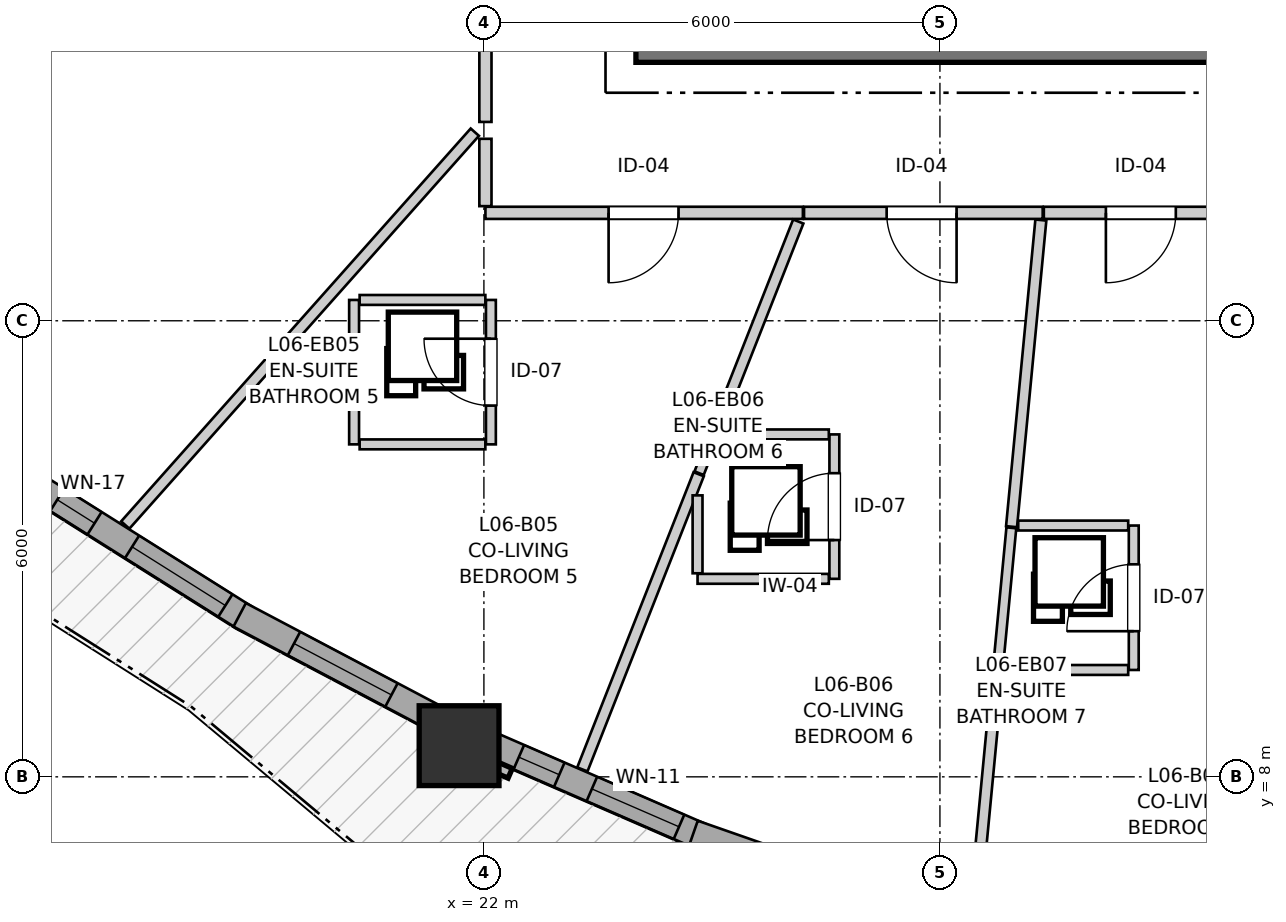
"""IFC4 building model, lengths in metres.
Left out: names, types, materials, properties, quantities, classifications, styles, units other than length and angle.
Written with IfcOpenShell. Run it as: python <this file> out.ifc"""

import sys

from ifc_helpers import new_model, si_unit, direction, frame, frame_2d, origin, origin_2d, place, context, subcontext, project, spatial, rectangle, extrude, source, transform, mapped, element, fill, save


model = new_model("IFC4")
c1 = context("Model", 3, precision=1e-05, world=origin(), true_north=direction((0.0, 1.0)))
c2 = subcontext(c1, "Body", "Model", "MODEL_VIEW")
j1 = project(units=[si_unit("LENGTHUNIT", "METRE"), si_unit("PLANEANGLEUNIT", "RADIAN")], contexts=[c1])
p1 = place(None, origin())
s1 = spatial("IfcSite", under=j1, at=p1, CompositionType="ELEMENT")
p2 = place(p1, origin())
s2 = spatial("IfcBuilding", under=s1, at=p2, CompositionType="ELEMENT")
p3 = place(p2, frame((0.0, 0.0, 23.8)))
s3 = spatial("IfcBuildingStorey", under=s2, at=p3, CompositionType="ELEMENT", Elevation=23.8)
p4 = place(p3, frame((24.0, 17.8, 0.0), z_axis=(0.0, 0.0, 1.0), x_axis=(1.0, 0.0, 0.0)))
e1 = element("IfcWall", 1, at=p4, inside=s3, PredefinedType="SHEAR", context=c2, shape_type="SweptSolid", body=[
    extrude(rectangle(XDim=12.7, YDim=0.8, at=frame_2d((6.35, 0.0))), origin(), (0.0, 0.0, 1.0), 2.935),
])
m1 = source(origin(), c2, "Body", "SweptSolid", [
    extrude(rectangle(XDim=1.05, YDim=1.05, at=origin_2d()), origin(), (0.0, 0.0, 1.0), 2.935),
])
p5 = place(p3, frame((21.673, 8.41, 0.0), z_axis=(0.0, 0.0, 1.0), x_axis=(1.0, 0.0, 0.0)))
e2 = element("IfcColumn", 2, at=p5, inside=s3, PredefinedType="COLUMN", context=c2, shape_type="MappedRepresentation", body=[
    mapped(m1, transform((0.0, 0.0, 0.0), x_axis=(1.0, 0.0, 0.0), y_axis=(0.0, 1.0, 0.0), z_axis=(0.0, 0.0, 1.0), scale=1.0)),
])
p6 = place(p3, frame((16.04, 11.864, 0.0), z_axis=(0.0, 0.0, 1.0), x_axis=(0.846428302834, -0.532502702492, 0.0)))
e3 = element("IfcWall", 3, at=p6, inside=s3, PredefinedType="SOLIDWALL", context=c2, shape_type="SweptSolid", body=[
    extrude(rectangle(XDim=3.336, YDim=0.35, at=frame_2d((1.668, 0.0))), origin(), (0.0, 0.0, 1.0), 2.415),
])
p7 = place(p6, frame((0.409, 0.0, 0.82)))
e4 = element("IfcOpeningElement", 4, at=p7, cuts=e3, PredefinedType="OPENING", context=c2, shape_type="SweptSolid", body=[
    extrude(rectangle(XDim=0.58, YDim=1.35, at=frame_2d((0.29, 0.675))), frame((0.0, 0.185, 0.0), z_axis=(0.0, -1.0, 0.0), x_axis=(1.0, 0.0, 0.0)), (0.0, 0.0, 1.0), 0.37),
])
p8 = place(p6, frame((1.573, 0.0, 0.82)))
e5 = element("IfcOpeningElement", 5, at=p8, cuts=e3, PredefinedType="OPENING", context=c2, shape_type="SweptSolid", body=[
    extrude(rectangle(XDim=1.45, YDim=1.25, at=frame_2d((0.725, 0.625))), frame((0.0, 0.185, 0.0), z_axis=(0.0, -1.0, 0.0), x_axis=(1.0, 0.0, 0.0)), (0.0, 0.0, 1.0), 0.37),
])
p9 = place(p3, frame((18.787, 10.131, 0.0), z_axis=(0.0, 0.0, 1.0), x_axis=(0.88440307047, -0.466723910834, 0.0)))
e6 = element("IfcWall", 6, at=p9, inside=s3, PredefinedType="SOLIDWALL", context=c2, shape_type="SweptSolid", body=[
    extrude(rectangle(XDim=3.056, YDim=0.35, at=frame_2d((1.528, 0.0))), origin(), (0.0, 0.0, 1.0), 2.415),
])
p10 = place(p9, frame((0.808, 0.0, 0.82)))
e7 = element("IfcOpeningElement", 7, at=p10, cuts=e6, PredefinedType="OPENING", context=c2, shape_type="SweptSolid", body=[
    extrude(rectangle(XDim=1.45, YDim=1.25, at=frame_2d((0.725, 0.625))), frame((0.0, 0.185, 0.0), z_axis=(0.0, -1.0, 0.0), x_axis=(1.0, 0.0, 0.0)), (0.0, 0.0, 1.0), 0.37),
])
p11 = place(p3, frame((22.018, 8.451, 0.0), z_axis=(0.0, 0.0, 1.0), x_axis=(0.917071318244, -0.398723208824, 0.0)))
e8 = element("IfcWall", 8, at=p11, inside=s3, PredefinedType="SOLIDWALL", context=c2, shape_type="SweptSolid", body=[
    extrude(rectangle(XDim=3.076, YDim=0.35, at=frame_2d((1.538, 0.0))), origin(), (0.0, 0.0, 1.0), 2.415),
])
p12 = place(p11, frame((0.481, 0.0, 0.82)))
e9 = element("IfcOpeningElement", 9, at=p12, cuts=e8, PredefinedType="OPENING", context=c2, shape_type="SweptSolid", body=[
    extrude(rectangle(XDim=0.58, YDim=1.35, at=frame_2d((0.29, 0.675))), frame((0.0, 0.185, 0.0), z_axis=(0.0, -1.0, 0.0), x_axis=(1.0, 0.0, 0.0)), (0.0, 0.0, 1.0), 0.37),
])
p13 = place(p11, frame((1.529, 0.0, 0.82)))
e10 = element("IfcOpeningElement", 10, at=p13, cuts=e8, PredefinedType="OPENING", context=c2, shape_type="SweptSolid", body=[
    extrude(rectangle(XDim=1.25, YDim=1.35, at=frame_2d((0.625, 0.675))), frame((0.0, 0.185, 0.0), z_axis=(0.0, -1.0, 0.0), x_axis=(1.0, 0.0, 0.0)), (0.0, 0.0, 1.0), 0.37),
])
p14 = place(p3, frame((24.756, 7.257, 0.0), z_axis=(0.0, 0.0, 1.0), x_axis=(0.944142925437, -0.329536244361, 0.0)))
e11 = element("IfcWall", 11, at=p14, inside=s3, PredefinedType="SOLIDWALL", context=c2, shape_type="SweptSolid", body=[
    extrude(rectangle(XDim=3.393, YDim=0.35, at=frame_2d((1.697, 0.0))), origin(), (0.0, 0.0, 1.0), 2.415),
])
p15 = place(p14, frame((0.982, 0.0, 0.82)))
e12 = element("IfcOpeningElement", 12, at=p15, cuts=e11, PredefinedType="OPENING", context=c2, shape_type="SweptSolid", body=[
    extrude(rectangle(XDim=1.45, YDim=1.25, at=frame_2d((0.725, 0.625))), frame((0.0, 0.185, 0.0), z_axis=(0.0, -1.0, 0.0), x_axis=(1.0, 0.0, 0.0)), (0.0, 0.0, 1.0), 0.37),
])
p16 = place(p3, frame((22.02, 16.616, 0.0), z_axis=(0.0, 0.0, 1.0), x_axis=(0.0, 1.0, 0.0)))
e13 = element("IfcWall", 13, at=p16, inside=s3, PredefinedType="PARTITIONING", context=c2, shape_type="SweptSolid", body=[
    extrude(rectangle(XDim=7.534, YDim=0.16, at=frame_2d((3.767, 0.0))), origin(), (0.0, 0.0, 1.0), 2.935),
])
p17 = place(p16, frame((2.98, 0.0, 0.0)))
e14 = element("IfcOpeningElement", 14, at=p17, cuts=e13, PredefinedType="OPENING", context=c2, shape_type="SweptSolid", body=[
    extrude(rectangle(XDim=1.3, YDim=2.1, at=frame_2d((0.65, 1.05))), frame((0.0, 0.09, 0.0), z_axis=(0.0, -1.0, 0.0), x_axis=(1.0, 0.0, 0.0)), (0.0, 0.0, 1.0), 0.18),
])
p18 = place(p3, frame((26.197, 15.42, 0.0), z_axis=(0.0, 0.0, 1.0), x_axis=(-1.0, 0.0, 0.0)))
e15 = element("IfcWall", 15, at=p18, inside=s3, PredefinedType="PARTITIONING", context=c2, shape_type="SweptSolid", body=[
    extrude(rectangle(XDim=4.177, YDim=0.16, at=frame_2d((2.088, 0.0))), origin(), (0.0, 0.0, 1.0), 2.935),
])
p19 = place(p18, frame((1.636, 0.0, 0.0)))
e16 = element("IfcOpeningElement", 16, at=p19, cuts=e15, PredefinedType="OPENING", context=c2, shape_type="SweptSolid", body=[
    extrude(rectangle(XDim=0.92, YDim=2.1, at=frame_2d((0.46, 1.05))), frame((0.0, 0.09, 0.0), z_axis=(0.0, -1.0, 0.0), x_axis=(1.0, 0.0, 0.0)), (0.0, 0.0, 1.0), 0.18),
])
p20 = place(p3, frame((29.352, 15.42, 0.0), z_axis=(0.0, 0.0, 1.0), x_axis=(-1.0, 0.0, 0.0)))
e17 = element("IfcWall", 17, at=p20, inside=s3, PredefinedType="PARTITIONING", context=c2, shape_type="SweptSolid", body=[
    extrude(rectangle(XDim=3.14, YDim=0.16, at=frame_2d((1.57, 0.0))), origin(), (0.0, 0.0, 1.0), 2.935),
])
p21 = place(p20, frame((1.133, 0.0, 0.0)))
e18 = element("IfcOpeningElement", 18, at=p21, cuts=e17, PredefinedType="OPENING", context=c2, shape_type="SweptSolid", body=[
    extrude(rectangle(XDim=0.92, YDim=2.1, at=frame_2d((0.46, 1.05))), frame((0.0, 0.09, 0.0), z_axis=(0.0, -1.0, 0.0), x_axis=(1.0, 0.0, 0.0)), (0.0, 0.0, 1.0), 0.18),
])
p22 = place(p3, frame((31.965, 15.42, 0.0), z_axis=(0.0, 0.0, 1.0), x_axis=(-1.0, 0.0, 0.0)))
e19 = element("IfcWall", 19, at=p22, inside=s3, PredefinedType="PARTITIONING", context=c2, shape_type="SweptSolid", body=[
    extrude(rectangle(XDim=2.598, YDim=0.16, at=frame_2d((1.299, 0.0))), origin(), (0.0, 0.0, 1.0), 2.935),
])
p23 = place(p22, frame((0.862, 0.0, 0.0)))
e20 = element("IfcOpeningElement", 20, at=p23, cuts=e19, PredefinedType="OPENING", context=c2, shape_type="SweptSolid", body=[
    extrude(rectangle(XDim=0.92, YDim=2.1, at=frame_2d((0.46, 1.05))), frame((0.0, 0.09, 0.0), z_axis=(0.0, -1.0, 0.0), x_axis=(1.0, 0.0, 0.0)), (0.0, 0.0, 1.0), 0.18),
])
p24 = place(p3, frame((26.611, 10.605, 0.0), z_axis=(0.0, 0.0, 1.0), x_axis=(0.0, 1.0, 0.0)))
e21 = element("IfcWall", 21, at=p24, inside=s3, PredefinedType="PARTITIONING", context=c2, shape_type="SweptSolid", body=[
    extrude(rectangle(XDim=1.9, YDim=0.13, at=frame_2d((0.95, 0.0))), origin(), (0.0, 0.0, 1.0), 2.935),
])
p25 = place(p24, frame((0.51, 0.0, 0.0)))
e22 = element("IfcOpeningElement", 22, at=p25, cuts=e21, PredefinedType="OPENING", context=c2, shape_type="SweptSolid", body=[
    extrude(rectangle(XDim=0.88, YDim=2.05, at=frame_2d((0.44, 1.025))), frame((0.0, 0.075, 0.0), z_axis=(0.0, -1.0, 0.0), x_axis=(1.0, 0.0, 0.0)), (0.0, 0.0, 1.0), 0.15),
])
p26 = place(p3, frame((22.092, 12.374, 0.0), z_axis=(0.0, 0.0, 1.0), x_axis=(0.0, 1.0, 0.0)))
e23 = element("IfcWall", 23, at=p26, inside=s3, PredefinedType="PARTITIONING", context=c2, shape_type="SweptSolid", body=[
    extrude(rectangle(XDim=1.9, YDim=0.13, at=frame_2d((0.95, 0.0))), origin(), (0.0, 0.0, 1.0), 2.935),
])
p27 = place(p26, frame((0.51, 0.0, 0.0)))
e24 = element("IfcOpeningElement", 24, at=p27, cuts=e23, PredefinedType="OPENING", context=c2, shape_type="SweptSolid", body=[
    extrude(rectangle(XDim=0.88, YDim=2.05, at=frame_2d((0.44, 1.025))), frame((0.0, 0.075, 0.0), z_axis=(0.0, -1.0, 0.0), x_axis=(1.0, 0.0, 0.0)), (0.0, 0.0, 1.0), 0.15),
])
p28 = place(p3, frame((30.55, 9.406, 0.0), z_axis=(0.0, 0.0, 1.0), x_axis=(0.0, 1.0, 0.0)))
e25 = element("IfcWall", 25, at=p28, inside=s3, PredefinedType="PARTITIONING", context=c2, shape_type="SweptSolid", body=[
    extrude(rectangle(XDim=1.9, YDim=0.13, at=frame_2d((0.95, 0.0))), origin(), (0.0, 0.0, 1.0), 2.935),
])
p29 = place(p28, frame((0.51, 0.0, 0.0)))
e26 = element("IfcOpeningElement", 26, at=p29, cuts=e25, PredefinedType="OPENING", context=c2, shape_type="SweptSolid", body=[
    extrude(rectangle(XDim=0.88, YDim=2.05, at=frame_2d((0.44, 1.025))), frame((0.0, 0.075, 0.0), z_axis=(0.0, -1.0, 0.0), x_axis=(1.0, 0.0, 0.0)), (0.0, 0.0, 1.0), 0.15),
])
p30 = place(p3, frame((17.281, 11.313, 0.0), z_axis=(0.0, 0.0, 1.0), x_axis=(0.664782074701, 0.747037343883, 0.0)))
e27 = element("IfcWall", 27, at=p30, inside=s3, PredefinedType="PARTITIONING", context=c2, shape_type="SweptSolid", body=[
    extrude(rectangle(XDim=6.919, YDim=0.145, at=frame_2d((3.459, 0.0))), origin(), (0.0, 0.0, 1.0), 2.935),
])
p31 = place(p3, frame((23.295, 8.098, 0.0), z_axis=(0.0, 0.0, 1.0), x_axis=(0.366696366135, 0.930340676883, 0.0)))
e28 = element("IfcWall", 28, at=p31, inside=s3, PredefinedType="PARTITIONING", context=c2, shape_type="SweptSolid", body=[
    extrude(rectangle(XDim=4.174, YDim=0.145, at=frame_2d((2.087, 0.0))), origin(), (0.0, 0.0, 1.0), 2.935),
])
p32 = place(p3, frame((28.942, 11.291, 0.0), z_axis=(0.0, 0.0, 1.0), x_axis=(0.095244050973, 0.995453952101, 0.0)))
e29 = element("IfcWall", 29, at=p32, inside=s3, PredefinedType="PARTITIONING", context=c2, shape_type="SweptSolid", body=[
    extrude(rectangle(XDim=4.052, YDim=0.145, at=frame_2d((2.026, 0.0))), origin(), (0.0, 0.0, 1.0), 2.935),
])
p33 = place(p3, frame((28.455, 6.206, 0.0), z_axis=(0.0, 0.0, 1.0), x_axis=(0.095101625286, 0.995467568968, 0.0)))
e30 = element("IfcWall", 30, at=p33, inside=s3, PredefinedType="PARTITIONING", context=c2, shape_type="SweptSolid", body=[
    extrude(rectangle(XDim=3.229, YDim=0.145, at=frame_2d((1.615, 0.0))), origin(), (0.0, 0.0, 1.0), 2.935),
])
p34 = place(p3, frame((25.026, 12.49, 0.0), z_axis=(0.0, 0.0, 1.0), x_axis=(0.366755134598, 0.930317510985, 0.0)))
e31 = element("IfcWall", 31, at=p34, inside=s3, PredefinedType="PARTITIONING", context=c2, shape_type="SweptSolid", body=[
    extrude(rectangle(XDim=3.027, YDim=0.145, at=frame_2d((1.513, 0.0))), origin(), (0.0, 0.0, 1.0), 2.935),
])
p35 = place(p3, frame((20.292, 12.374, 0.0), z_axis=(0.0, 0.0, 1.0), x_axis=(0.0, 1.0, 0.0)))
e32 = element("IfcWall", 32, at=p35, inside=s3, PredefinedType="PARTITIONING", context=c2, shape_type="SweptSolid", body=[
    extrude(rectangle(XDim=1.9, YDim=0.13, at=frame_2d((0.95, 0.0))), origin(), (0.0, 0.0, 1.0), 2.935),
])
p36 = place(p3, frame((28.764, 9.436, 0.0), z_axis=(0.0, 0.0, 1.0), x_axis=(0.094821557036, 0.995494285429, 0.0)))
e33 = element("IfcWall", 33, at=p36, inside=s3, PredefinedType="PARTITIONING", context=c2, shape_type="SweptSolid", body=[
    extrude(rectangle(XDim=1.849, YDim=0.13, at=frame_2d((0.924, 0.0))), origin(), (0.0, 0.0, 1.0), 2.935),
])
p37 = place(p3, frame((24.811, 10.605, 0.0), z_axis=(0.0, 0.0, 1.0), x_axis=(1.0, 0.0, 0.0)))
e34 = element("IfcWall", 34, at=p37, inside=s3, PredefinedType="PARTITIONING", context=c2, shape_type="SweptSolid", body=[
    extrude(rectangle(XDim=1.727, YDim=0.13, at=frame_2d((0.864, 0.0))), origin(), (0.0, 0.0, 1.0), 2.503),
])
for number, where, z_axis, x_axis in (
    (35, (20.365, 14.274, 0.0), (0.0, 0.0, 1.0), (1.0, 0.0, 0.0)),
    (36, (20.365, 12.374, 0.0), (0.0, 0.0, 1.0), (1.0, 0.0, 0.0)),
):
    element("IfcWall", number, at=place(p3, frame(where, z_axis=z_axis, x_axis=x_axis)), inside=s3, PredefinedType="PARTITIONING", context=c2, shape_type="SweptSolid", body=[
        extrude(rectangle(XDim=1.654, YDim=0.13, at=frame_2d((0.827, 0.0))), origin(), (0.0, 0.0, 1.0), 2.935),
    ])
p38 = place(p3, frame((28.848, 9.406, 0.0), z_axis=(0.0, 0.0, 1.0), x_axis=(1.0, 0.0, 0.0)))
e37 = element("IfcWall", 37, at=p38, inside=s3, PredefinedType="PARTITIONING", context=c2, shape_type="SweptSolid", body=[
    extrude(rectangle(XDim=1.629, YDim=0.13, at=frame_2d((0.814, 0.0))), origin(), (0.0, 0.0, 1.0), 2.503),
])
p39 = place(p3, frame((29.03, 11.306, 0.0), z_axis=(0.0, 0.0, 1.0), x_axis=(1.0, 0.0, 0.0)))
e38 = element("IfcWall", 38, at=p39, inside=s3, PredefinedType="PARTITIONING", context=c2, shape_type="SweptSolid", body=[
    extrude(rectangle(XDim=1.447, YDim=0.13, at=frame_2d((0.724, 0.0))), origin(), (0.0, 0.0, 1.0), 2.935),
])
p40 = place(p3, frame((25.144, 12.505, 0.0), z_axis=(0.0, 0.0, 1.0), x_axis=(1.0, 0.0, 0.0)))
e39 = element("IfcWall", 39, at=p40, inside=s3, PredefinedType="PARTITIONING", context=c2, shape_type="SweptSolid", body=[
    extrude(rectangle(XDim=1.395, YDim=0.13, at=frame_2d((0.697, 0.0))), origin(), (0.0, 0.0, 1.0), 2.935),
])
p41 = place(p3, frame((24.811, 10.678, 0.0), z_axis=(0.0, 0.0, 1.0), x_axis=(0.0, 1.0, 0.0)))
e40 = element("IfcWall", 40, at=p41, inside=s3, PredefinedType="PARTITIONING", context=c2, shape_type="SweptSolid", body=[
    extrude(rectangle(XDim=1.025, YDim=0.13, at=frame_2d((0.512, 0.0))), origin(), (0.0, 0.0, 1.0), 2.935),
])
p42 = place(p3, frame((22.02, 15.508, 0.0), z_axis=(0.0, 0.0, 1.0), x_axis=(0.0, 1.0, 0.0)))
e41 = element("IfcWall", 41, at=p42, inside=s3, PredefinedType="PARTITIONING", context=c2, shape_type="SweptSolid", body=[
    extrude(rectangle(XDim=0.886, YDim=0.16, at=frame_2d((0.443, 0.0))), origin(), (0.0, 0.0, 1.0), 2.935),
])
p43 = place(p3, frame((24.831, 11.995, 0.0), z_axis=(0.0, 0.0, 1.0), x_axis=(0.366499739739, 0.93041815372, 0.0)))
e42 = element("IfcWall", 42, at=p43, inside=s3, PredefinedType="PARTITIONING", context=c2, shape_type="SweptSolid", body=[
    extrude(rectangle(XDim=0.517, YDim=0.13, at=frame_2d((0.258, 0.0))), origin(), (0.0, 0.0, 1.0), 2.935),
])
m2 = source(origin(), c2, "Body", "SweptSolid", [
    extrude(rectangle(XDim=0.58, YDim=1.35, at=frame_2d((0.29, 0.675))), frame((0.0, 0.03, 0.0), z_axis=(0.0, -1.0, 0.0), x_axis=(1.0, 0.0, 0.0)), (0.0, 0.0, 1.0), 0.06),
])
p44 = place(p7, origin())
e43 = element("IfcWindow", 43, at=p44, inside=s3, PartitioningType="SINGLE_PANEL", PredefinedType="WINDOW", context=c2, shape_type="MappedRepresentation", body=[
    mapped(m2, transform((0.0, 0.0, 0.0), x_axis=(1.0, 0.0, 0.0), y_axis=(0.0, 1.0, 0.0), z_axis=(0.0, 0.0, 1.0), scale=1.0)),
])
fill(e4, e43)
m3 = source(origin(), c2, "Body", "SweptSolid", [
    extrude(rectangle(XDim=1.45, YDim=1.25, at=frame_2d((0.725, 0.625))), frame((0.0, 0.03, 0.0), z_axis=(0.0, -1.0, 0.0), x_axis=(1.0, 0.0, 0.0)), (0.0, 0.0, 1.0), 0.06),
])
p45 = place(p8, origin())
e44 = element("IfcWindow", 44, at=p45, inside=s3, PartitioningType="SINGLE_PANEL", PredefinedType="WINDOW", context=c2, shape_type="MappedRepresentation", body=[
    mapped(m3, transform((0.0, 0.0, 0.0), x_axis=(1.0, 0.0, 0.0), y_axis=(0.0, 1.0, 0.0), z_axis=(0.0, 0.0, 1.0), scale=1.0)),
])
fill(e5, e44)
p46 = place(p10, origin())
e45 = element("IfcWindow", 45, at=p46, inside=s3, PartitioningType="SINGLE_PANEL", PredefinedType="WINDOW", context=c2, shape_type="MappedRepresentation", body=[
    mapped(m3, transform((0.0, 0.0, 0.0), x_axis=(1.0, 0.0, 0.0), y_axis=(0.0, 1.0, 0.0), z_axis=(0.0, 0.0, 1.0), scale=1.0)),
])
fill(e7, e45)
p47 = place(p12, origin())
e46 = element("IfcWindow", 46, at=p47, inside=s3, PartitioningType="SINGLE_PANEL", PredefinedType="WINDOW", context=c2, shape_type="MappedRepresentation", body=[
    mapped(m2, transform((0.0, 0.0, 0.0), x_axis=(1.0, 0.0, 0.0), y_axis=(0.0, 1.0, 0.0), z_axis=(0.0, 0.0, 1.0), scale=1.0)),
])
fill(e9, e46)
m4 = source(origin(), c2, "Body", "SweptSolid", [
    extrude(rectangle(XDim=1.25, YDim=1.35, at=frame_2d((0.625, 0.675))), frame((0.0, 0.03, 0.0), z_axis=(0.0, -1.0, 0.0), x_axis=(1.0, 0.0, 0.0)), (0.0, 0.0, 1.0), 0.06),
])
p48 = place(p13, origin())
e47 = element("IfcWindow", 47, at=p48, inside=s3, PartitioningType="SINGLE_PANEL", PredefinedType="WINDOW", context=c2, shape_type="MappedRepresentation", body=[
    mapped(m4, transform((0.0, 0.0, 0.0), x_axis=(1.0, 0.0, 0.0), y_axis=(0.0, 1.0, 0.0), z_axis=(0.0, 0.0, 1.0), scale=1.0)),
])
fill(e10, e47)
m5 = source(origin(), c2, "Body", "SweptSolid", [
    extrude(rectangle(XDim=0.92, YDim=2.1, at=frame_2d((0.46, 1.05))), frame((0.0, 0.025, 0.0), z_axis=(0.0, -1.0, 0.0), x_axis=(1.0, 0.0, 0.0)), (0.0, 0.0, 1.0), 0.05),
])
p49 = place(p19, origin())
e48 = element("IfcDoor", 48, at=p49, inside=s3, OperationType="SINGLE_SWING_RIGHT", PredefinedType="DOOR", context=c2, shape_type="MappedRepresentation", body=[
    mapped(m5, transform((0.0, 0.0, 0.0), x_axis=(1.0, 0.0, 0.0), y_axis=(0.0, 1.0, 0.0), z_axis=(0.0, 0.0, 1.0), scale=1.0)),
])
fill(e16, e48)
p50 = place(p21, origin())
e49 = element("IfcDoor", 49, at=p50, inside=s3, OperationType="SINGLE_SWING_LEFT", PredefinedType="DOOR", context=c2, shape_type="MappedRepresentation", body=[
    mapped(m5, transform((0.0, 0.0, 0.0), x_axis=(1.0, 0.0, 0.0), y_axis=(0.0, 1.0, 0.0), z_axis=(0.0, 0.0, 1.0), scale=1.0)),
])
fill(e18, e49)
p51 = place(p23, origin())
e50 = element("IfcDoor", 50, at=p51, inside=s3, OperationType="SINGLE_SWING_RIGHT", PredefinedType="DOOR", context=c2, shape_type="MappedRepresentation", body=[
    mapped(m5, transform((0.0, 0.0, 0.0), x_axis=(1.0, 0.0, 0.0), y_axis=(0.0, 1.0, 0.0), z_axis=(0.0, 0.0, 1.0), scale=1.0)),
])
fill(e20, e50)
m6 = source(origin(), c2, "Body", "SweptSolid", [
    extrude(rectangle(XDim=0.88, YDim=2.05, at=frame_2d((0.44, 1.025))), frame((0.0, 0.025, 0.0), z_axis=(0.0, -1.0, 0.0), x_axis=(1.0, 0.0, 0.0)), (0.0, 0.0, 1.0), 0.05),
])
p52 = place(p25, origin())
e51 = element("IfcDoor", 51, at=p52, inside=s3, OperationType="SINGLE_SWING_LEFT", PredefinedType="DOOR", context=c2, shape_type="MappedRepresentation", body=[
    mapped(m6, transform((0.0, 0.0, 0.0), x_axis=(1.0, 0.0, 0.0), y_axis=(0.0, 1.0, 0.0), z_axis=(0.0, 0.0, 1.0), scale=1.0)),
])
fill(e22, e51)
p53 = place(p27, origin())
e52 = element("IfcDoor", 52, at=p53, inside=s3, OperationType="SINGLE_SWING_RIGHT", PredefinedType="DOOR", context=c2, shape_type="MappedRepresentation", body=[
    mapped(m6, transform((0.0, 0.0, 0.0), x_axis=(1.0, 0.0, 0.0), y_axis=(0.0, 1.0, 0.0), z_axis=(0.0, 0.0, 1.0), scale=1.0)),
])
fill(e24, e52)
p54 = place(p29, origin())
e53 = element("IfcDoor", 53, at=p54, inside=s3, OperationType="SINGLE_SWING_LEFT", PredefinedType="DOOR", context=c2, shape_type="MappedRepresentation", body=[
    mapped(m6, transform((0.0, 0.0, 0.0), x_axis=(1.0, 0.0, 0.0), y_axis=(0.0, 1.0, 0.0), z_axis=(0.0, 0.0, 1.0), scale=1.0)),
])
fill(e26, e53)
save(model, sys.argv[1])
